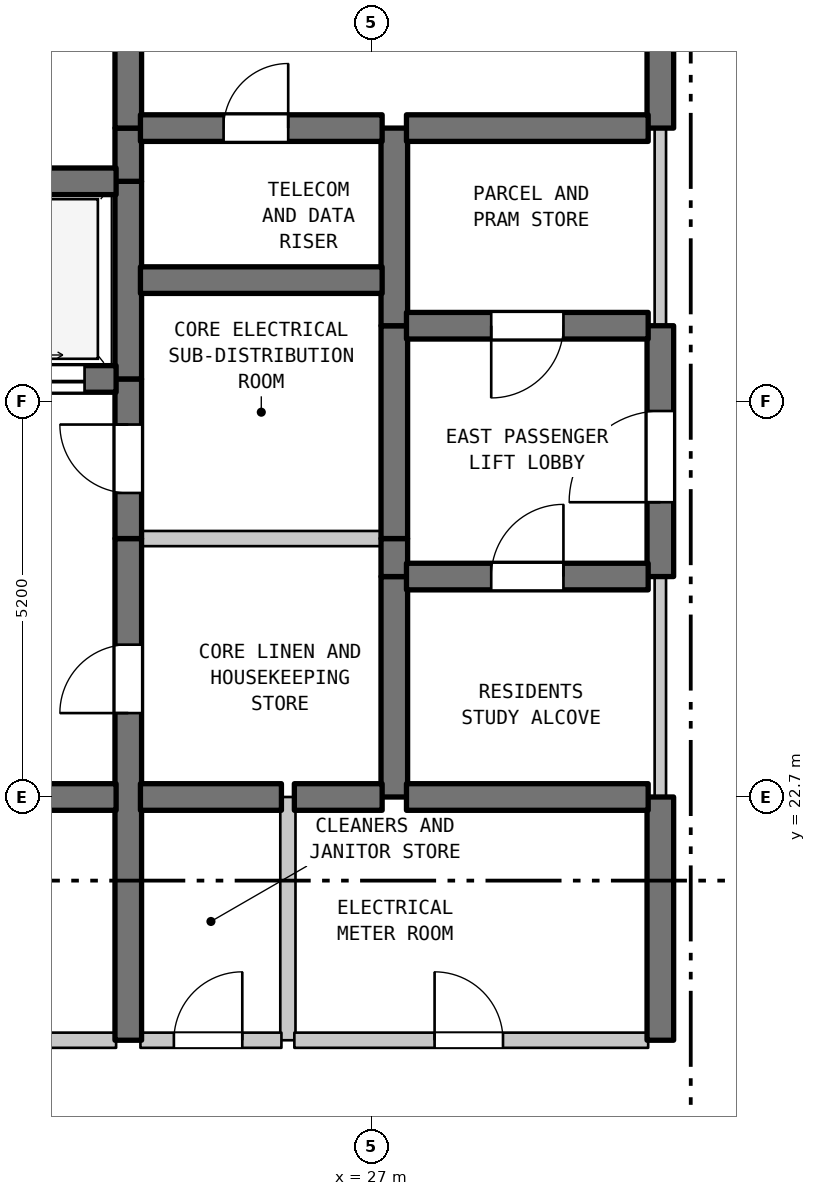
"""IFC4 building model, lengths in metres.
Left out: names, types, materials, properties, quantities, classifications, styles, units other than length and angle.
Written with IfcOpenShell. Run it as: python <this file> out.ifc"""

import sys

from ifc_helpers import new_model, si_unit, direction, frame, frame_2d, origin, place, context, subcontext, project, spatial, rectangle, extrude, element, fill, save


model = new_model("IFC4")
c1 = context("Model", 3, precision=1e-05, world=origin(), true_north=direction((0.0, 1.0)))
c2 = subcontext(c1, "Body", "Model", "MODEL_VIEW")
j1 = project(units=[si_unit("LENGTHUNIT", "METRE"), si_unit("PLANEANGLEUNIT", "RADIAN")], contexts=[c1])
p1 = place(None, origin())
s1 = spatial("IfcSite", under=j1, at=p1, CompositionType="ELEMENT")
p2 = place(p1, origin())
s2 = spatial("IfcBuilding", under=s1, at=p2, CompositionType="ELEMENT")
p3 = place(p2, frame((0.0, 0.0, 254.7)))
s3 = spatial("IfcBuildingStorey", under=s2, at=p3, CompositionType="ELEMENT", Elevation=254.7)
p4 = place(p3, frame((23.8, 19.5, 0.0), z_axis=(0.0, 0.0, 1.0), x_axis=(0.0, 1.0, 0.0)))
e1 = element("IfcWall", 1, at=p4, inside=s3, PredefinedType="SHEAR", context=c2, shape_type="SweptSolid", body=[
    extrude(rectangle(XDim=6.6, YDim=0.35, at=frame_2d((3.3, 0.0))), origin(), (0.0, 0.0, 1.0), 3.39),
])
p5 = place(p4, frame((4.304, 0.0, 0.0)))
e2 = element("IfcOpeningElement", 2, at=p5, cuts=e1, PredefinedType="OPENING", context=c2, shape_type="SweptSolid", body=[
    extrude(rectangle(XDim=0.9, YDim=2.15, at=frame_2d((0.45, 1.075))), frame((0.0, 0.185, 0.0), z_axis=(0.0, -1.0, 0.0), x_axis=(1.0, 0.0, 0.0)), (0.0, 0.0, 1.0), 0.37),
])
p6 = place(p3, frame((23.8, 26.1, 0.0), z_axis=(0.0, 0.0, 1.0), x_axis=(0.0, 1.0, 0.0)))
e3 = element("IfcWall", 3, at=p6, inside=s3, PredefinedType="SHEAR", context=c2, shape_type="SweptSolid", body=[
    extrude(rectangle(XDim=2.1, YDim=0.35, at=frame_2d((1.05, 0.0))), origin(), (0.0, 0.0, 1.0), 3.39),
])
p7 = place(p6, frame((0.6, 0.0, 0.0)))
e4 = element("IfcOpeningElement", 4, at=p7, cuts=e3, PredefinedType="OPENING", context=c2, shape_type="SweptSolid", body=[
    extrude(rectangle(XDim=0.9, YDim=2.15, at=frame_2d((0.45, 1.075))), frame((0.0, 0.185, 0.0), z_axis=(0.0, -1.0, 0.0), x_axis=(1.0, 0.0, 0.0)), (0.0, 0.0, 1.0), 0.37),
])
p8 = place(p3, frame((23.8, 28.2, 0.0), z_axis=(0.0, 0.0, 1.0), x_axis=(0.0, 1.0, 0.0)))
e5 = element("IfcWall", 5, at=p8, inside=s3, PredefinedType="SHEAR", context=c2, shape_type="SweptSolid", body=[
    extrude(rectangle(XDim=2.6, YDim=0.35, at=frame_2d((1.3, 0.0))), origin(), (0.0, 0.0, 1.0), 3.39),
])
p9 = place(p3, frame((23.8, 30.8, 0.0), z_axis=(0.0, 0.0, 1.0), x_axis=(0.0, 1.0, 0.0)))
e6 = element("IfcWall", 6, at=p9, inside=s3, PredefinedType="SHEAR", context=c2, shape_type="SweptSolid", body=[
    extrude(rectangle(XDim=0.7, YDim=0.35, at=frame_2d((0.35, 0.0))), origin(), (0.0, 0.0, 1.0), 3.39),
])
p10 = place(p3, frame((23.8, 31.5, 0.0), z_axis=(0.0, 0.0, 1.0), x_axis=(0.0, 1.0, 0.0)))
e7 = element("IfcWall", 7, at=p10, inside=s3, PredefinedType="SHEAR", context=c2, shape_type="SweptSolid", body=[
    extrude(rectangle(XDim=3.5, YDim=0.35, at=frame_2d((1.75, 0.0))), origin(), (0.0, 0.0, 1.0), 3.39),
])
p11 = place(p10, frame((1.127, 0.0, 0.0)))
e8 = element("IfcOpeningElement", 8, at=p11, cuts=e7, PredefinedType="OPENING", context=c2, shape_type="SweptSolid", body=[
    extrude(rectangle(XDim=1.1, YDim=2.15, at=frame_2d((0.55, 1.075))), frame((0.0, 0.185, 0.0), z_axis=(0.0, -1.0, 0.0), x_axis=(1.0, 0.0, 0.0)), (0.0, 0.0, 1.0), 0.37),
])
p12 = place(p3, frame((25.9, 19.5, 0.0), z_axis=(0.0, 0.0, 1.0), x_axis=(0.0, 1.0, 0.0)))
e9 = element("IfcWall", 9, at=p12, inside=s3, PredefinedType="STANDARD", context=c2, shape_type="SweptSolid", body=[
    extrude(rectangle(XDim=3.2, YDim=0.2, at=frame_2d((1.6, 0.0))), origin(), (0.0, 0.0, 1.0), 3.39),
])
p13 = place(p3, frame((27.3, 22.7, 0.0), z_axis=(0.0, 0.0, 1.0), x_axis=(0.0, 1.0, 0.0)))
e10 = element("IfcWall", 10, at=p13, inside=s3, PredefinedType="SHEAR", context=c2, shape_type="SweptSolid", body=[
    extrude(rectangle(XDim=2.9, YDim=0.35, at=frame_2d((1.45, 0.0))), origin(), (0.0, 0.0, 1.0), 3.39),
])
p14 = place(p3, frame((27.3, 25.6, 0.0), z_axis=(0.0, 0.0, 1.0), x_axis=(0.0, 1.0, 0.0)))
e11 = element("IfcWall", 11, at=p14, inside=s3, PredefinedType="SHEAR", context=c2, shape_type="SweptSolid", body=[
    extrude(rectangle(XDim=0.5, YDim=0.35, at=frame_2d((0.25, 0.0))), origin(), (0.0, 0.0, 1.0), 3.39),
])
p15 = place(p3, frame((27.3, 26.1, 0.0), z_axis=(0.0, 0.0, 1.0), x_axis=(0.0, 1.0, 0.0)))
e12 = element("IfcWall", 12, at=p15, inside=s3, PredefinedType="SHEAR", context=c2, shape_type="SweptSolid", body=[
    extrude(rectangle(XDim=2.8, YDim=0.35, at=frame_2d((1.4, 0.0))), origin(), (0.0, 0.0, 1.0), 3.39),
])
p16 = place(p3, frame((27.3, 28.9, 0.0), z_axis=(0.0, 0.0, 1.0), x_axis=(0.0, 1.0, 0.0)))
e13 = element("IfcWall", 13, at=p16, inside=s3, PredefinedType="SHEAR", context=c2, shape_type="SweptSolid", body=[
    extrude(rectangle(XDim=2.6, YDim=0.35, at=frame_2d((1.3, 0.0))), origin(), (0.0, 0.0, 1.0), 3.39),
])
p17 = place(p3, frame((30.8, 19.5, 0.0), z_axis=(0.0, 0.0, 1.0), x_axis=(0.0, 1.0, 0.0)))
e14 = element("IfcWall", 14, at=p17, inside=s3, PredefinedType="SHEAR", context=c2, shape_type="SweptSolid", body=[
    extrude(rectangle(XDim=3.2, YDim=0.35, at=frame_2d((1.6, 0.0))), origin(), (0.0, 0.0, 1.0), 3.39),
])
p18 = place(p3, frame((30.8, 22.7, 0.0), z_axis=(0.0, 0.0, 1.0), x_axis=(0.0, 1.0, 0.0)))
e15 = element("IfcWall", 15, at=p18, inside=s3, PredefinedType="STANDARD", context=c2, shape_type="SweptSolid", body=[
    extrude(rectangle(XDim=2.9, YDim=0.15, at=frame_2d((1.45, 0.0))), origin(), (0.0, 0.0, 1.0), 3.39),
])
p19 = place(p3, frame((30.8, 25.6, 0.0), z_axis=(0.0, 0.0, 1.0), x_axis=(0.0, 1.0, 0.0)))
e16 = element("IfcWall", 16, at=p19, inside=s3, PredefinedType="SHEAR", context=c2, shape_type="SweptSolid", body=[
    extrude(rectangle(XDim=3.3, YDim=0.35, at=frame_2d((1.65, 0.0))), origin(), (0.0, 0.0, 1.0), 3.39),
])
p20 = place(p19, frame((0.978, 0.0, 0.0)))
e17 = element("IfcOpeningElement", 17, at=p20, cuts=e16, PredefinedType="OPENING", context=c2, shape_type="SweptSolid", body=[
    extrude(rectangle(XDim=1.2, YDim=2.2, at=frame_2d((0.6, 1.1))), frame((0.0, 0.185, 0.0), z_axis=(0.0, -1.0, 0.0), x_axis=(1.0, 0.0, 0.0)), (0.0, 0.0, 1.0), 0.37),
])
p21 = place(p3, frame((30.8, 28.9, 0.0), z_axis=(0.0, 0.0, 1.0), x_axis=(0.0, 1.0, 0.0)))
e18 = element("IfcWall", 18, at=p21, inside=s3, PredefinedType="STANDARD", context=c2, shape_type="SweptSolid", body=[
    extrude(rectangle(XDim=2.6, YDim=0.15, at=frame_2d((1.3, 0.0))), origin(), (0.0, 0.0, 1.0), 3.39),
])
p22 = place(p3, frame((30.8, 31.5, 0.0), z_axis=(0.0, 0.0, 1.0), x_axis=(0.0, 1.0, 0.0)))
e19 = element("IfcWall", 19, at=p22, inside=s3, PredefinedType="SHEAR", context=c2, shape_type="SweptSolid", body=[
    extrude(rectangle(XDim=3.5, YDim=0.35, at=frame_2d((1.75, 0.0))), origin(), (0.0, 0.0, 1.0), 3.39),
])
p23 = place(p22, frame((1.15, 0.0, 0.0)))
e20 = element("IfcOpeningElement", 20, at=p23, cuts=e19, PredefinedType="OPENING", context=c2, shape_type="SweptSolid", body=[
    extrude(rectangle(XDim=1.2, YDim=2.2, at=frame_2d((0.6, 1.1))), frame((0.0, 0.185, 0.0), z_axis=(0.0, -1.0, 0.0), x_axis=(1.0, 0.0, 0.0)), (0.0, 0.0, 1.0), 0.37),
])
p24 = place(p3, frame((19.16, 19.5, 0.0), z_axis=(0.0, 0.0, 1.0), x_axis=(1.0, 0.0, 0.0)))
e21 = element("IfcWall", 21, at=p24, inside=s3, PredefinedType="STANDARD", context=c2, shape_type="SweptSolid", body=[
    extrude(rectangle(XDim=4.48, YDim=0.2, at=frame_2d((2.24, 0.0))), origin(), (0.0, 0.0, 1.0), 3.39),
])
p25 = place(p24, frame((1.64, 0.0, 0.0)))
e22 = element("IfcOpeningElement", 22, at=p25, cuts=e21, PredefinedType="OPENING", context=c2, shape_type="SweptSolid", body=[
    extrude(rectangle(XDim=1.2, YDim=2.2, at=frame_2d((0.6, 1.1))), frame((0.0, 0.11, 0.0), z_axis=(0.0, -1.0, 0.0), x_axis=(1.0, 0.0, 0.0)), (0.0, 0.0, 1.0), 0.22),
])
p26 = place(p3, frame((23.96, 19.5, 0.0), z_axis=(0.0, 0.0, 1.0), x_axis=(1.0, 0.0, 0.0)))
e23 = element("IfcWall", 23, at=p26, inside=s3, PredefinedType="STANDARD", context=c2, shape_type="SweptSolid", body=[
    extrude(rectangle(XDim=1.855, YDim=0.2, at=frame_2d((0.927, 0.0))), origin(), (0.0, 0.0, 1.0), 3.39),
])
p27 = place(p26, frame((0.44, 0.0, 0.0)))
e24 = element("IfcOpeningElement", 24, at=p27, cuts=e23, PredefinedType="OPENING", context=c2, shape_type="SweptSolid", body=[
    extrude(rectangle(XDim=0.9, YDim=2.15, at=frame_2d((0.45, 1.075))), frame((0.0, 0.11, 0.0), z_axis=(0.0, -1.0, 0.0), x_axis=(1.0, 0.0, 0.0)), (0.0, 0.0, 1.0), 0.22),
])
p28 = place(p3, frame((25.985, 19.5, 0.0), z_axis=(0.0, 0.0, 1.0), x_axis=(1.0, 0.0, 0.0)))
e25 = element("IfcWall", 25, at=p28, inside=s3, PredefinedType="STANDARD", context=c2, shape_type="SweptSolid", body=[
    extrude(rectangle(XDim=4.655, YDim=0.2, at=frame_2d((2.327, 0.0))), origin(), (0.0, 0.0, 1.0), 3.39),
])
p29 = place(p28, frame((1.845, 0.0, 0.0)))
e26 = element("IfcOpeningElement", 26, at=p29, cuts=e25, PredefinedType="OPENING", context=c2, shape_type="SweptSolid", body=[
    extrude(rectangle(XDim=0.9, YDim=2.15, at=frame_2d((0.45, 1.075))), frame((0.0, 0.11, 0.0), z_axis=(0.0, -1.0, 0.0), x_axis=(1.0, 0.0, 0.0)), (0.0, 0.0, 1.0), 0.22),
])
p30 = place(p3, frame((19.16, 22.7, 0.0), z_axis=(0.0, 0.0, 1.0), x_axis=(1.0, 0.0, 0.0)))
e27 = element("IfcWall", 27, at=p30, inside=s3, PredefinedType="SHEAR", context=c2, shape_type="SweptSolid", body=[
    extrude(rectangle(XDim=4.48, YDim=0.35, at=frame_2d((2.24, 0.0))), origin(), (0.0, 0.0, 1.0), 3.39),
])
p31 = place(p30, frame((1.64, 0.0, 0.0)))
e28 = element("IfcOpeningElement", 28, at=p31, cuts=e27, PredefinedType="OPENING", context=c2, shape_type="SweptSolid", body=[
    extrude(rectangle(XDim=1.2, YDim=2.2, at=frame_2d((0.6, 1.1))), frame((0.0, 0.185, 0.0), z_axis=(0.0, -1.0, 0.0), x_axis=(1.0, 0.0, 0.0)), (0.0, 0.0, 1.0), 0.37),
])
p32 = place(p3, frame((23.96, 22.7, 0.0), z_axis=(0.0, 0.0, 1.0), x_axis=(1.0, 0.0, 0.0)))
e29 = element("IfcWall", 29, at=p32, inside=s3, PredefinedType="SHEAR", context=c2, shape_type="SweptSolid", body=[
    extrude(rectangle(XDim=1.855, YDim=0.35, at=frame_2d((0.927, 0.0))), origin(), (0.0, 0.0, 1.0), 3.39),
])
p33 = place(p3, frame((25.985, 22.7, 0.0), z_axis=(0.0, 0.0, 1.0), x_axis=(1.0, 0.0, 0.0)))
e30 = element("IfcWall", 30, at=p33, inside=s3, PredefinedType="SHEAR", context=c2, shape_type="SweptSolid", body=[
    extrude(rectangle(XDim=1.155, YDim=0.35, at=frame_2d((0.577, 0.0))), origin(), (0.0, 0.0, 1.0), 3.39),
])
p34 = place(p3, frame((27.46, 22.7, 0.0), z_axis=(0.0, 0.0, 1.0), x_axis=(1.0, 0.0, 0.0)))
e31 = element("IfcWall", 31, at=p34, inside=s3, PredefinedType="SHEAR", context=c2, shape_type="SweptSolid", body=[
    extrude(rectangle(XDim=3.18, YDim=0.35, at=frame_2d((1.59, 0.0))), origin(), (0.0, 0.0, 1.0), 3.39),
])
p35 = place(p3, frame((27.46, 25.6, 0.0), z_axis=(0.0, 0.0, 1.0), x_axis=(1.0, 0.0, 0.0)))
e32 = element("IfcWall", 32, at=p35, inside=s3, PredefinedType="SHEAR", context=c2, shape_type="SweptSolid", body=[
    extrude(rectangle(XDim=3.18, YDim=0.35, at=frame_2d((1.59, 0.0))), origin(), (0.0, 0.0, 1.0), 3.39),
])
p36 = place(p35, frame((1.115, 0.0, 0.0)))
e33 = element("IfcOpeningElement", 33, at=p36, cuts=e32, PredefinedType="OPENING", context=c2, shape_type="SweptSolid", body=[
    extrude(rectangle(XDim=0.95, YDim=2.15, at=frame_2d((0.475, 1.075))), frame((0.0, 0.185, 0.0), z_axis=(0.0, -1.0, 0.0), x_axis=(1.0, 0.0, 0.0)), (0.0, 0.0, 1.0), 0.37),
])
p37 = place(p3, frame((23.96, 26.1, 0.0), z_axis=(0.0, 0.0, 1.0), x_axis=(1.0, 0.0, 0.0)))
e34 = element("IfcWall", 34, at=p37, inside=s3, PredefinedType="STANDARD", context=c2, shape_type="SweptSolid", body=[
    extrude(rectangle(XDim=3.18, YDim=0.2, at=frame_2d((1.59, 0.0))), origin(), (0.0, 0.0, 1.0), 3.39),
])
p38 = place(p3, frame((19.16, 28.2, 0.0), z_axis=(0.0, 0.0, 1.0), x_axis=(1.0, 0.0, 0.0)))
e35 = element("IfcWall", 35, at=p38, inside=s3, PredefinedType="SHEAR", context=c2, shape_type="SweptSolid", body=[
    extrude(rectangle(XDim=4.48, YDim=0.35, at=frame_2d((2.24, 0.0))), origin(), (0.0, 0.0, 1.0), 3.39),
])
p39 = place(p38, frame((0.415, 0.0, 0.0)))
e36 = element("IfcOpeningElement", 36, at=p39, cuts=e35, PredefinedType="OPENING", context=c2, shape_type="SweptSolid", body=[
    extrude(rectangle(XDim=1.25, YDim=2.2, at=frame_2d((0.625, 1.1))), frame((0.0, 0.185, 0.0), z_axis=(0.0, -1.0, 0.0), x_axis=(1.0, 0.0, 0.0)), (0.0, 0.0, 1.0), 0.37),
])
p40 = place(p38, frame((2.815, 0.0, 0.0)))
e37 = element("IfcOpeningElement", 37, at=p40, cuts=e35, PredefinedType="OPENING", context=c2, shape_type="SweptSolid", body=[
    extrude(rectangle(XDim=1.25, YDim=2.2, at=frame_2d((0.625, 1.1))), frame((0.0, 0.185, 0.0), z_axis=(0.0, -1.0, 0.0), x_axis=(1.0, 0.0, 0.0)), (0.0, 0.0, 1.0), 0.37),
])
p41 = place(p3, frame((27.46, 28.9, 0.0), z_axis=(0.0, 0.0, 1.0), x_axis=(1.0, 0.0, 0.0)))
e38 = element("IfcWall", 38, at=p41, inside=s3, PredefinedType="SHEAR", context=c2, shape_type="SweptSolid", body=[
    extrude(rectangle(XDim=3.18, YDim=0.35, at=frame_2d((1.59, 0.0))), origin(), (0.0, 0.0, 1.0), 3.39),
])
p42 = place(p41, frame((1.115, 0.0, 0.0)))
e39 = element("IfcOpeningElement", 39, at=p42, cuts=e38, PredefinedType="OPENING", context=c2, shape_type="SweptSolid", body=[
    extrude(rectangle(XDim=0.95, YDim=2.15, at=frame_2d((0.475, 1.075))), frame((0.0, 0.185, 0.0), z_axis=(0.0, -1.0, 0.0), x_axis=(1.0, 0.0, 0.0)), (0.0, 0.0, 1.0), 0.37),
])
p43 = place(p3, frame((23.96, 29.5, 0.0), z_axis=(0.0, 0.0, 1.0), x_axis=(1.0, 0.0, 0.0)))
e40 = element("IfcWall", 40, at=p43, inside=s3, PredefinedType="SHEAR", context=c2, shape_type="SweptSolid", body=[
    extrude(rectangle(XDim=3.18, YDim=0.35, at=frame_2d((1.59, 0.0))), origin(), (0.0, 0.0, 1.0), 3.39),
])
p44 = place(p3, frame((19.16, 30.8, 0.0), z_axis=(0.0, 0.0, 1.0), x_axis=(1.0, 0.0, 0.0)))
e41 = element("IfcWall", 41, at=p44, inside=s3, PredefinedType="SHEAR", context=c2, shape_type="SweptSolid", body=[
    extrude(rectangle(XDim=4.48, YDim=0.35, at=frame_2d((2.24, 0.0))), origin(), (0.0, 0.0, 1.0), 3.39),
])
p45 = place(p3, frame((23.96, 31.5, 0.0), z_axis=(0.0, 0.0, 1.0), x_axis=(1.0, 0.0, 0.0)))
e42 = element("IfcWall", 42, at=p45, inside=s3, PredefinedType="SHEAR", context=c2, shape_type="SweptSolid", body=[
    extrude(rectangle(XDim=3.18, YDim=0.35, at=frame_2d((1.59, 0.0))), origin(), (0.0, 0.0, 1.0), 3.39),
])
p46 = place(p45, frame((1.094, 0.0, 0.0)))
e43 = element("IfcOpeningElement", 43, at=p46, cuts=e42, PredefinedType="OPENING", context=c2, shape_type="SweptSolid", body=[
    extrude(rectangle(XDim=0.85, YDim=2.1, at=frame_2d((0.425, 1.05))), frame((0.0, 0.185, 0.0), z_axis=(0.0, -1.0, 0.0), x_axis=(1.0, 0.0, 0.0)), (0.0, 0.0, 1.0), 0.37),
])
p47 = place(p3, frame((27.46, 31.5, 0.0), z_axis=(0.0, 0.0, 1.0), x_axis=(1.0, 0.0, 0.0)))
e44 = element("IfcWall", 44, at=p47, inside=s3, PredefinedType="SHEAR", context=c2, shape_type="SweptSolid", body=[
    extrude(rectangle(XDim=3.18, YDim=0.35, at=frame_2d((1.59, 0.0))), origin(), (0.0, 0.0, 1.0), 3.39),
])
p48 = place(p5, origin())
e45 = element("IfcDoor", 45, at=p48, inside=s3, OperationType="SINGLE_SWING_LEFT", PredefinedType="DOOR", context=c2, shape_type="SweptSolid", body=[
    extrude(rectangle(XDim=0.9, YDim=2.15, at=frame_2d((0.45, 1.075))), frame((0.0, 0.025, 0.0), z_axis=(0.0, -1.0, 0.0), x_axis=(1.0, 0.0, 0.0)), (0.0, 0.0, 1.0), 0.05),
])
fill(e2, e45)
p49 = place(p7, origin())
e46 = element("IfcDoor", 46, at=p49, inside=s3, OperationType="SINGLE_SWING_RIGHT", PredefinedType="DOOR", context=c2, shape_type="SweptSolid", body=[
    extrude(rectangle(XDim=0.9, YDim=2.15, at=frame_2d((0.45, 1.075))), frame((0.0, 0.025, 0.0), z_axis=(0.0, -1.0, 0.0), x_axis=(1.0, 0.0, 0.0)), (0.0, 0.0, 1.0), 0.05),
])
fill(e4, e46)
p50 = place(p20, origin())
e47 = element("IfcDoor", 47, at=p50, inside=s3, OperationType="SINGLE_SWING_LEFT", PredefinedType="DOOR", context=c2, shape_type="SweptSolid", body=[
    extrude(rectangle(XDim=1.2, YDim=2.2, at=frame_2d((0.6, 1.1))), frame((0.0, 0.025, 0.0), z_axis=(0.0, -1.0, 0.0), x_axis=(1.0, 0.0, 0.0)), (0.0, 0.0, 1.0), 0.05),
])
fill(e17, e47)
p51 = place(p27, origin())
e48 = element("IfcDoor", 48, at=p51, inside=s3, OperationType="SINGLE_SWING_RIGHT", PredefinedType="DOOR", context=c2, shape_type="SweptSolid", body=[
    extrude(rectangle(XDim=0.9, YDim=2.15, at=frame_2d((0.45, 1.075))), frame((0.0, 0.025, 0.0), z_axis=(0.0, -1.0, 0.0), x_axis=(1.0, 0.0, 0.0)), (0.0, 0.0, 1.0), 0.05),
])
fill(e24, e48)
p52 = place(p29, origin())
e49 = element("IfcDoor", 49, at=p52, inside=s3, OperationType="SINGLE_SWING_LEFT", PredefinedType="DOOR", context=c2, shape_type="SweptSolid", body=[
    extrude(rectangle(XDim=0.9, YDim=2.15, at=frame_2d((0.45, 1.075))), frame((0.0, 0.025, 0.0), z_axis=(0.0, -1.0, 0.0), x_axis=(1.0, 0.0, 0.0)), (0.0, 0.0, 1.0), 0.05),
])
fill(e26, e49)
p53 = place(p36, origin())
e50 = element("IfcDoor", 50, at=p53, inside=s3, OperationType="SINGLE_SWING_RIGHT", PredefinedType="DOOR", context=c2, shape_type="SweptSolid", body=[
    extrude(rectangle(XDim=0.95, YDim=2.15, at=frame_2d((0.475, 1.075))), frame((0.0, 0.025, 0.0), z_axis=(0.0, -1.0, 0.0), x_axis=(1.0, 0.0, 0.0)), (0.0, 0.0, 1.0), 0.05),
])
fill(e33, e50)
p54 = place(p40, origin())
e51 = element("IfcDoor", 51, at=p54, inside=s3, OperationType="DOUBLE_DOOR_SLIDING", PredefinedType="DOOR", context=c2, shape_type="SweptSolid", body=[
    extrude(rectangle(XDim=1.25, YDim=2.2, at=frame_2d((0.625, 1.1))), frame((0.0, 0.025, 0.0), z_axis=(0.0, -1.0, 0.0), x_axis=(1.0, 0.0, 0.0)), (0.0, 0.0, 1.0), 0.05),
])
fill(e37, e51)
p55 = place(p42, frame((0.95, 0.0, 0.0), z_axis=(0.0, 0.0, 1.0), x_axis=(-1.0, 0.0, 0.0)))
e52 = element("IfcDoor", 52, at=p55, inside=s3, OperationType="SINGLE_SWING_LEFT", PredefinedType="DOOR", context=c2, shape_type="SweptSolid", body=[
    extrude(rectangle(XDim=0.95, YDim=2.15, at=frame_2d((0.475, 1.075))), frame((0.0, 0.025, 0.0), z_axis=(0.0, -1.0, 0.0), x_axis=(1.0, 0.0, 0.0)), (0.0, 0.0, 1.0), 0.05),
])
fill(e39, e52)
p56 = place(p46, origin())
e53 = element("IfcDoor", 53, at=p56, inside=s3, OperationType="SINGLE_SWING_RIGHT", PredefinedType="DOOR", context=c2, shape_type="SweptSolid", body=[
    extrude(rectangle(XDim=0.85, YDim=2.1, at=frame_2d((0.425, 1.05))), frame((0.0, 0.025, 0.0), z_axis=(0.0, -1.0, 0.0), x_axis=(1.0, 0.0, 0.0)), (0.0, 0.0, 1.0), 0.05),
])
fill(e43, e53)
save(model, sys.argv[1])
